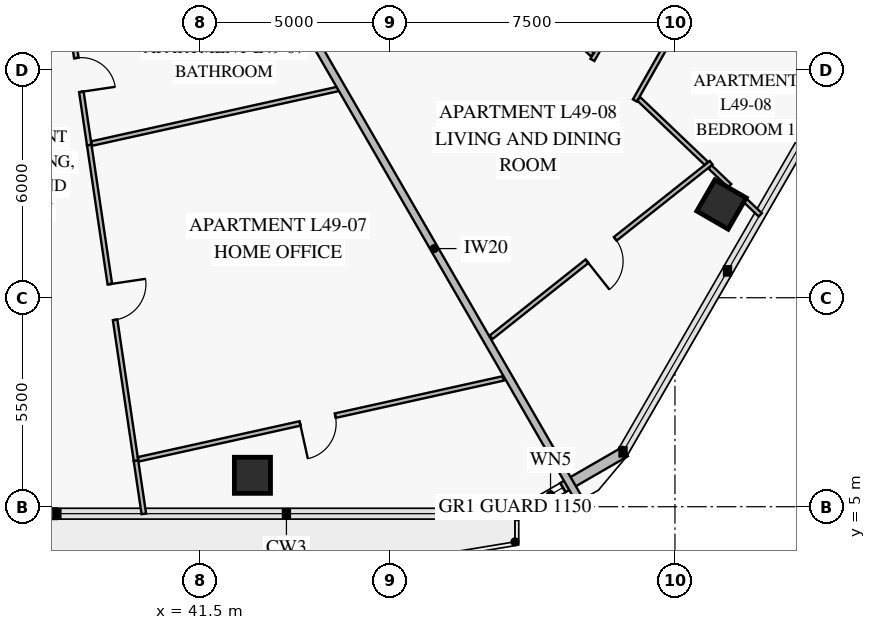
"""IFC4 building model, lengths in metres.
Left out: names, types, materials, properties, quantities, classifications, styles, units other than length and angle.
Written with IfcOpenShell. Run it as: python <this file> out.ifc"""

import sys

from ifc_helpers import new_model, si_unit, direction, frame, frame_2d, origin, origin_2d, place, context, subcontext, project, spatial, rectangle, extrude, element, fill, save


model = new_model("IFC4")
c1 = context("Model", 3, precision=1e-05, world=origin(), true_north=direction((0.0, 1.0)))
c2 = subcontext(c1, "Body", "Model", "MODEL_VIEW")
j1 = project(units=[si_unit("LENGTHUNIT", "METRE"), si_unit("PLANEANGLEUNIT", "RADIAN")], contexts=[c1])
p1 = place(None, origin())
s1 = spatial("IfcSite", under=j1, at=p1, CompositionType="ELEMENT")
p2 = place(p1, origin())
s2 = spatial("IfcBuilding", under=s1, at=p2, CompositionType="ELEMENT")
p3 = place(p2, frame((0.0, 0.0, 196.0)))
s3 = spatial("IfcBuildingStorey", under=s2, at=p3, CompositionType="ELEMENT", Elevation=196.0)
for number, where, z_axis, x_axis in (
    (1, (42.882, 5.827, 0.0), (0.0, 0.0, 1.0), (1.0, 0.0, 0.0)),
    (2, (55.226, 12.953, 0.0), (0.0, 0.0, 1.0), (0.5, 0.866, 0.0)),
):
    element("IfcColumn", number, at=place(p3, frame(where, z_axis=z_axis, x_axis=x_axis)), inside=s3, PredefinedType="COLUMN", context=c2, shape_type="SweptSolid", body=[
        extrude(rectangle(XDim=0.95, YDim=0.95, at=origin_2d()), origin(), (0.0, 0.0, 1.0), 3.55),
    ])
p4 = place(p3, frame((52.693, 6.452, 0.0), z_axis=(0.0, 0.0, 1.0), x_axis=(-0.866020068361, -0.500009241111, 0.0)))
e3 = element("IfcWall", 3, at=p4, inside=s3, PredefinedType="SOLIDWALL", context=c2, shape_type="SweptSolid", body=[
    extrude(rectangle(XDim=3.365, YDim=0.28, at=frame_2d((1.683, 0.0))), origin(), (0.0, 0.0, 1.0), 3.55),
])
p5 = place(p4, frame((1.896, 0.0, 0.85)))
e4 = element("IfcOpeningElement", 4, at=p5, cuts=e3, PredefinedType="OPENING", context=c2, shape_type="SweptSolid", body=[
    extrude(rectangle(XDim=0.75, YDim=1.5, at=frame_2d((0.375, 0.75))), frame((0.0, 0.152, 0.0), z_axis=(0.0, -1.0, 0.0), x_axis=(1.0, 0.0, 0.0)), (0.0, 0.0, 1.0), 0.304),
])
p6 = place(p3, frame((37.737, 4.817, 0.0), z_axis=(0.0, 0.0, 1.0), x_axis=(-1.0, 0.0, 0.0)))
e5 = element("IfcWall", 5, at=p6, inside=s3, PredefinedType="SOLIDWALL", context=c2, shape_type="SweptSolid", body=[
    extrude(rectangle(XDim=1.79, YDim=0.28, at=frame_2d((0.895, 0.0))), origin(), (0.0, 0.0, 1.0), 3.55),
])
p7 = place(p6, frame((0.345, 0.0, 0.0)))
e6 = element("IfcOpeningElement", 6, at=p7, cuts=e5, PredefinedType="OPENING", context=c2, shape_type="SweptSolid", body=[
    extrude(rectangle(XDim=1.1, YDim=2.2, at=frame_2d((0.55, 1.1))), frame((0.0, 0.152, 0.0), z_axis=(0.0, -1.0, 0.0), x_axis=(1.0, 0.0, 0.0)), (0.0, 0.0, 1.0), 0.304),
])
p8 = place(p3, frame((38.117, 17.7, 0.0), z_axis=(0.0, 0.0, 1.0), x_axis=(0.146444162785, -0.989218937944, 0.0)))
e7 = element("IfcWall", 7, at=p8, inside=s3, PredefinedType="PARTITIONING", context=c2, shape_type="SweptSolid", body=[
    extrude(rectangle(XDim=3.218, YDim=0.12, at=frame_2d((1.609, 0.0))), origin(), (0.0, 0.0, 1.0), 3.55),
])
p9 = place(p8, frame((0.901, 0.0, 0.0)))
e8 = element("IfcOpeningElement", 8, at=p9, cuts=e7, PredefinedType="OPENING", context=c2, shape_type="SweptSolid", body=[
    extrude(rectangle(XDim=0.9, YDim=2.1, at=frame_2d((0.45, 1.05))), frame((0.0, 0.072, 0.0), z_axis=(0.0, -1.0, 0.0), x_axis=(1.0, 0.0, 0.0)), (0.0, 0.0, 1.0), 0.144),
])
p10 = place(p3, frame((38.588, 14.517, 0.0), z_axis=(0.0, 0.0, 1.0), x_axis=(0.146416974586, -0.989222962508, 0.0)))
e9 = element("IfcWall", 9, at=p10, inside=s3, PredefinedType="PARTITIONING", context=c2, shape_type="SweptSolid", body=[
    extrude(rectangle(XDim=8.399, YDim=0.12, at=frame_2d((4.199, 0.0))), origin(), (0.0, 0.0, 1.0), 3.15),
])
p11 = place(p10, frame((3.699, 0.0, 0.0)))
e10 = element("IfcOpeningElement", 10, at=p11, cuts=e9, PredefinedType="OPENING", context=c2, shape_type="SweptSolid", body=[
    extrude(rectangle(XDim=0.95, YDim=2.1, at=frame_2d((0.475, 1.05))), frame((0.0, 0.072, 0.0), z_axis=(0.0, -1.0, 0.0), x_axis=(1.0, 0.0, 0.0)), (0.0, 0.0, 1.0), 0.144),
])
p12 = place(p3, frame((39.881, 6.248, 0.0), z_axis=(0.0, 0.0, 1.0), x_axis=(0.976292102638, 0.216457225167, 0.0)))
e11 = element("IfcWall", 11, at=p12, inside=s3, PredefinedType="PARTITIONING", context=c2, shape_type="SweptSolid", body=[
    extrude(rectangle(XDim=9.833, YDim=0.12, at=frame_2d((4.917, 0.0))), origin(), (0.0, 0.0, 1.0), 2.87),
])
p13 = place(p12, frame((4.357, 0.0, 0.0)))
e12 = element("IfcOpeningElement", 12, at=p13, cuts=e11, PredefinedType="OPENING", context=c2, shape_type="SweptSolid", body=[
    extrude(rectangle(XDim=0.95, YDim=2.1, at=frame_2d((0.475, 1.05))), frame((0.0, 0.072, 0.0), z_axis=(0.0, -1.0, 0.0), x_axis=(1.0, 0.0, 0.0)), (0.0, 0.0, 1.0), 0.144),
])
p14 = place(p3, frame((49.162, 9.458, 0.0), z_axis=(0.0, 0.0, 1.0), x_axis=(0.783468844614, 0.621431065782, 0.0)))
e13 = element("IfcWall", 13, at=p14, inside=s3, PredefinedType="PARTITIONING", context=c2, shape_type="SweptSolid", body=[
    extrude(rectangle(XDim=7.392, YDim=0.12, at=frame_2d((3.696, 0.0))), origin(), (0.0, 0.0, 1.0), 2.87),
])
p15 = place(p14, frame((3.221, 0.0, 0.0)))
e14 = element("IfcOpeningElement", 14, at=p15, cuts=e13, PredefinedType="OPENING", context=c2, shape_type="SweptSolid", body=[
    extrude(rectangle(XDim=0.95, YDim=2.1, at=frame_2d((0.475, 1.05))), frame((0.0, 0.072, 0.0), z_axis=(0.0, -1.0, 0.0), x_axis=(1.0, 0.0, 0.0)), (0.0, 0.0, 1.0), 0.144),
])
p16 = place(p3, frame((51.827, 16.758, 0.0), z_axis=(0.0, 0.0, 1.0), x_axis=(0.493634405262, 0.869669519957, 0.0)))
e15 = element("IfcWall", 15, at=p16, inside=s3, PredefinedType="PARTITIONING", context=c2, shape_type="SweptSolid", body=[
    extrude(rectangle(XDim=10.885, YDim=0.12, at=frame_2d((5.442, 0.0))), origin(), (0.0, 0.0, 1.0), 2.9),
])
p17 = place(p16, frame((2.036, 0.0, 0.0)))
e16 = element("IfcOpeningElement", 16, at=p17, cuts=e15, PredefinedType="OPENING", context=c2, shape_type="SweptSolid", body=[
    extrude(rectangle(XDim=0.95, YDim=2.1, at=frame_2d((0.475, 1.05))), frame((0.0, 0.072, 0.0), z_axis=(0.0, -1.0, 0.0), x_axis=(1.0, 0.0, 0.0)), (0.0, 0.0, 1.0), 0.144),
])
p18 = place(p16, frame((6.098, 0.0, 0.0)))
e17 = element("IfcOpeningElement", 17, at=p18, cuts=e15, PredefinedType="OPENING", context=c2, shape_type="SweptSolid", body=[
    extrude(rectangle(XDim=0.9, YDim=2.1, at=frame_2d((0.45, 1.05))), frame((0.0, 0.072, 0.0), z_axis=(0.0, -1.0, 0.0), x_axis=(1.0, 0.0, 0.0)), (0.0, 0.0, 1.0), 0.144),
])
p19 = place(p16, frame((9.029, 0.0, 0.0)))
e18 = element("IfcOpeningElement", 18, at=p19, cuts=e15, PredefinedType="OPENING", context=c2, shape_type="SweptSolid", body=[
    extrude(rectangle(XDim=0.9, YDim=2.1, at=frame_2d((0.45, 1.05))), frame((0.0, 0.072, 0.0), z_axis=(0.0, -1.0, 0.0), x_axis=(1.0, 0.0, 0.0)), (0.0, 0.0, 1.0), 0.144),
])
p20 = place(p3, frame((52.946, 15.691, 0.0), z_axis=(0.0, 0.0, 1.0), x_axis=(0.493647118533, 0.869662303635, 0.0)))
e19 = element("IfcWall", 19, at=p20, inside=s3, PredefinedType="PARTITIONING", context=c2, shape_type="SweptSolid", body=[
    extrude(rectangle(XDim=11.637, YDim=0.12, at=frame_2d((5.819, 0.0))), origin(), (0.0, 0.0, 1.0), 2.9),
])
p21 = place(p20, frame((2.484, 0.0, 0.0)))
e20 = element("IfcOpeningElement", 20, at=p21, cuts=e19, PredefinedType="OPENING", context=c2, shape_type="SweptSolid", body=[
    extrude(rectangle(XDim=0.95, YDim=2.1, at=frame_2d((0.475, 1.05))), frame((0.0, 0.072, 0.0), z_axis=(0.0, -1.0, 0.0), x_axis=(1.0, 0.0, 0.0)), (0.0, 0.0, 1.0), 0.144),
])
p22 = place(p20, frame((8.203, 0.0, 0.0)))
e21 = element("IfcOpeningElement", 21, at=p22, cuts=e19, PredefinedType="OPENING", context=c2, shape_type="SweptSolid", body=[
    extrude(rectangle(XDim=0.95, YDim=2.1, at=frame_2d((0.475, 1.05))), frame((0.0, 0.072, 0.0), z_axis=(0.0, -1.0, 0.0), x_axis=(1.0, 0.0, 0.0)), (0.0, 0.0, 1.0), 0.144),
])
p23 = place(p3, frame((39.818, 6.209, 0.0), z_axis=(0.0, 0.0, 1.0), x_axis=(0.146454662443, -0.989217383515, 0.0)))
e22 = element("IfcWall", 22, at=p23, inside=s3, PredefinedType="PARTITIONING", context=c2, shape_type="SweptSolid", body=[
    extrude(rectangle(XDim=1.412, YDim=0.12, at=frame_2d((0.706, 0.0))), origin(), (0.0, 0.0, 1.0), 2.87),
])
p24 = place(p3, frame((38.651, 14.557, 0.0), z_axis=(0.0, 0.0, 1.0), x_axis=(0.976292815714, 0.21645400894, 0.0)))
e23 = element("IfcWall", 23, at=p24, inside=s3, PredefinedType="PARTITIONING", context=c2, shape_type="SweptSolid", body=[
    extrude(rectangle(XDim=6.674, YDim=0.12, at=frame_2d((3.337, 0.0))), origin(), (0.0, 0.0, 1.0), 2.9),
])
p25 = place(p3, frame((43.904, 18.31, 0.0), z_axis=(0.0, 0.0, 1.0), x_axis=(0.500007038605, -0.866021340006, 0.0)))
e24 = element("IfcWall", 24, at=p25, inside=s3, PredefinedType="PARTITIONING", context=c2, shape_type="SweptSolid", body=[
    extrude(rectangle(XDim=15.05, YDim=0.2, at=frame_2d((7.525, 0.0))), origin(), (0.0, 0.0, 1.0), 2.87),
])
p26 = place(p3, frame((50.359, 18.298, 0.0), z_axis=(0.0, 0.0, 1.0), x_axis=(0.723451106681, -0.690375619675, 0.0)))
e25 = element("IfcWall", 25, at=p26, inside=s3, PredefinedType="PARTITIONING", context=c2, shape_type="SweptSolid", body=[
    extrude(rectangle(XDim=2.03, YDim=0.12, at=frame_2d((1.015, 0.0))), origin(), (0.0, 0.0, 1.0), 3.15),
])
p27 = place(p3, frame((53.048, 15.732, 0.0), z_axis=(0.0, 0.0, 1.0), x_axis=(0.723414212857, -0.690414278992, 0.0)))
e26 = element("IfcWall", 26, at=p27, inside=s3, PredefinedType="PARTITIONING", context=c2, shape_type="SweptSolid", body=[
    extrude(rectangle(XDim=2.456, YDim=0.12, at=frame_2d((1.228, 0.0))), origin(), (0.0, 0.0, 1.0), 3.55),
])
p28 = place(p3, frame((54.924, 13.941, 0.0), z_axis=(0.0, 0.0, 1.0), x_axis=(0.723503085089, -0.690321146907, 0.0)))
e27 = element("IfcWall", 27, at=p28, inside=s3, PredefinedType="PARTITIONING", context=c2, shape_type="SweptSolid", body=[
    extrude(rectangle(XDim=0.714, YDim=0.12, at=frame_2d((0.357, 0.0))), origin(), (0.0, 0.0, 1.0), 2.87),
])
p29 = place(p3, frame((55.72, 13.181, 0.0), z_axis=(0.0, 0.0, 1.0), x_axis=(0.723584936245, -0.690235351195, 0.0)))
e28 = element("IfcWall", 28, at=p29, inside=s3, PredefinedType="PARTITIONING", context=c2, shape_type="SweptSolid", body=[
    extrude(rectangle(XDim=0.725, YDim=0.12, at=frame_2d((0.362, 0.0))), origin(), (0.0, 0.0, 1.0), 3.55),
])
p30 = place(p5, origin())
e29 = element("IfcWindow", 29, at=p30, inside=s3, PartitioningType="SINGLE_PANEL", PredefinedType="WINDOW", context=c2, shape_type="SweptSolid", body=[
    extrude(rectangle(XDim=0.75, YDim=1.5, at=frame_2d((0.375, 0.75))), frame((0.0, 0.03, 0.0), z_axis=(0.0, -1.0, 0.0), x_axis=(1.0, 0.0, 0.0)), (0.0, 0.0, 1.0), 0.06),
])
fill(e4, e29)
p31 = place(p9, origin())
e30 = element("IfcDoor", 30, at=p31, inside=s3, OperationType="SINGLE_SWING_RIGHT", PredefinedType="DOOR", context=c2, shape_type="SweptSolid", body=[
    extrude(rectangle(XDim=0.9, YDim=2.1, at=frame_2d((0.45, 1.05))), frame((0.0, 0.025, 0.0), z_axis=(0.0, -1.0, 0.0), x_axis=(1.0, 0.0, 0.0)), (0.0, 0.0, 1.0), 0.05),
])
fill(e8, e30)
p32 = place(p11, origin())
e31 = element("IfcDoor", 31, at=p32, inside=s3, OperationType="SINGLE_SWING_LEFT", PredefinedType="DOOR", context=c2, shape_type="SweptSolid", body=[
    extrude(rectangle(XDim=0.95, YDim=2.1, at=frame_2d((0.475, 1.05))), frame((0.0, 0.025, 0.0), z_axis=(0.0, -1.0, 0.0), x_axis=(1.0, 0.0, 0.0)), (0.0, 0.0, 1.0), 0.05),
])
fill(e10, e31)
p33 = place(p13, frame((0.95, 0.0, 0.0), z_axis=(0.0, 0.0, 1.0), x_axis=(-1.0, 0.0, 0.0)))
e32 = element("IfcDoor", 32, at=p33, inside=s3, OperationType="SINGLE_SWING_RIGHT", PredefinedType="DOOR", context=c2, shape_type="SweptSolid", body=[
    extrude(rectangle(XDim=0.95, YDim=2.1, at=frame_2d((0.475, 1.05))), frame((0.0, 0.025, 0.0), z_axis=(0.0, -1.0, 0.0), x_axis=(1.0, 0.0, 0.0)), (0.0, 0.0, 1.0), 0.05),
])
fill(e12, e32)
p34 = place(p15, frame((0.95, 0.0, 0.0), z_axis=(0.0, 0.0, 1.0), x_axis=(-1.0, 0.0, 0.0)))
e33 = element("IfcDoor", 33, at=p34, inside=s3, OperationType="SINGLE_SWING_RIGHT", PredefinedType="DOOR", context=c2, shape_type="SweptSolid", body=[
    extrude(rectangle(XDim=0.95, YDim=2.1, at=frame_2d((0.475, 1.05))), frame((0.0, 0.025, 0.0), z_axis=(0.0, -1.0, 0.0), x_axis=(1.0, 0.0, 0.0)), (0.0, 0.0, 1.0), 0.05),
])
fill(e14, e33)
save(model, sys.argv[1])
